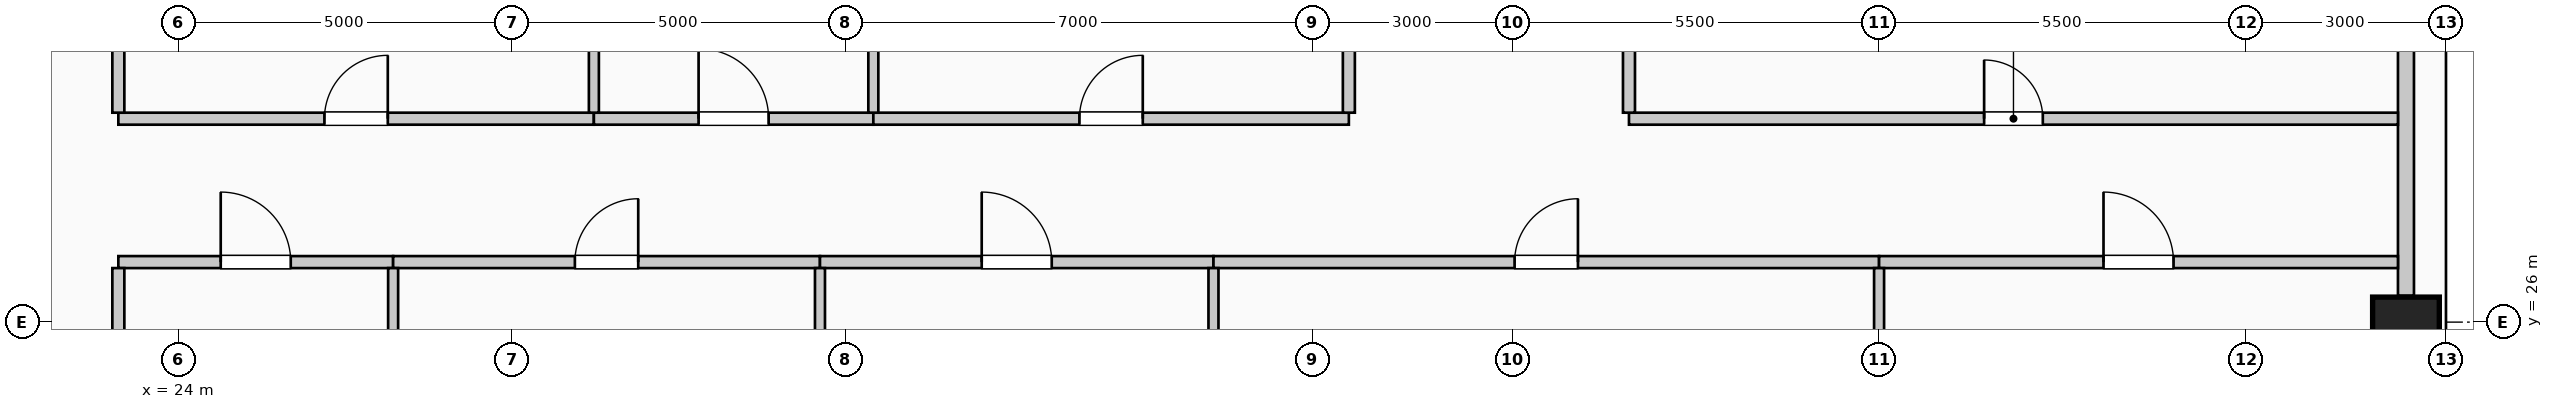
"""IFC4 building model, lengths in metres.
Left out: names, types, materials, properties, quantities, classifications, styles, units other than length and angle.
Written with IfcOpenShell. Run it as: python <this file> out.ifc"""

import sys

from ifc_helpers import new_model, si_unit, direction, frame, frame_2d, origin, origin_2d, place, context, subcontext, project, spatial, rectangle, extrude, element, fill, save


model = new_model("IFC4")
c1 = context("Model", 3, precision=1e-05, world=origin(), true_north=direction((0.0, 1.0)))
c2 = subcontext(c1, "Body", "Model", "MODEL_VIEW")
j1 = project(units=[si_unit("LENGTHUNIT", "METRE"), si_unit("PLANEANGLEUNIT", "RADIAN")], contexts=[c1])
p1 = place(None, origin())
s1 = spatial("IfcSite", under=j1, at=p1, CompositionType="ELEMENT")
p2 = place(p1, origin())
s2 = spatial("IfcBuilding", under=s1, at=p2, CompositionType="ELEMENT")
p3 = place(p2, frame((0.0, 0.0, 260.6)))
s3 = spatial("IfcBuildingStorey", under=s2, at=p3, CompositionType="ELEMENT", Elevation=260.6)
p4 = place(p3, frame((57.4, 26.0, 0.0), z_axis=(0.0, 0.0, 1.0), x_axis=(0.0, 1.0, 0.0)))
e1 = element("IfcColumn", 1, at=p4, inside=s3, PredefinedType="COLUMN", context=c2, shape_type="SweptSolid", body=[
    extrude(rectangle(XDim=0.75, YDim=1.0, at=origin_2d()), origin(), (0.0, 0.0, 1.0), 4.0),
])
p5 = place(p3, frame((57.4, 33.605, 0.0), z_axis=(0.0, 0.0, 1.0), x_axis=(0.0, -1.0, 0.0)))
e2 = element("IfcWall", 2, at=p5, inside=s3, PredefinedType="SOLIDWALL", context=c2, shape_type="SweptSolid", body=[
    extrude(rectangle(XDim=7.21, YDim=0.24, at=frame_2d((3.605, 0.0))), origin(), (0.0, 0.0, 1.0), 3.0),
])
p6 = place(p3, frame((23.1, 26.9, 0.0), z_axis=(0.0, 0.0, 1.0), x_axis=(1.0, 0.0, 0.0)))
e3 = element("IfcWall", 3, at=p6, inside=s3, PredefinedType="PARTITIONING", context=c2, shape_type="SweptSolid", body=[
    extrude(rectangle(XDim=4.12, YDim=0.18, at=frame_2d((2.06, 0.0))), origin(), (0.0, 0.0, 1.0), 3.75),
])
p7 = place(p6, frame((1.535, 0.0, 0.0)))
e4 = element("IfcOpeningElement", 4, at=p7, cuts=e3, PredefinedType="OPENING", context=c2, shape_type="SweptSolid", body=[
    extrude(rectangle(XDim=1.05, YDim=2.15, at=frame_2d((0.525, 1.075))), frame((0.0, 0.1, 0.0), z_axis=(0.0, -1.0, 0.0), x_axis=(1.0, 0.0, 0.0)), (0.0, 0.0, 1.0), 0.2),
])
p8 = place(p3, frame((27.22, 26.9, 0.0), z_axis=(0.0, 0.0, 1.0), x_axis=(1.0, 0.0, 0.0)))
e5 = element("IfcWall", 5, at=p8, inside=s3, PredefinedType="PARTITIONING", context=c2, shape_type="SweptSolid", body=[
    extrude(rectangle(XDim=6.4, YDim=0.18, at=frame_2d((3.2, 0.0))), origin(), (0.0, 0.0, 1.0), 3.75),
])
p9 = place(p8, frame((2.725, 0.0, 0.0)))
e6 = element("IfcOpeningElement", 6, at=p9, cuts=e5, PredefinedType="OPENING", context=c2, shape_type="SweptSolid", body=[
    extrude(rectangle(XDim=0.95, YDim=2.15, at=frame_2d((0.475, 1.075))), frame((0.0, 0.1, 0.0), z_axis=(0.0, -1.0, 0.0), x_axis=(1.0, 0.0, 0.0)), (0.0, 0.0, 1.0), 0.2),
])
p10 = place(p3, frame((33.62, 26.9, 0.0), z_axis=(0.0, 0.0, 1.0), x_axis=(1.0, 0.0, 0.0)))
e7 = element("IfcWall", 7, at=p10, inside=s3, PredefinedType="PARTITIONING", context=c2, shape_type="SweptSolid", body=[
    extrude(rectangle(XDim=5.9, YDim=0.18, at=frame_2d((2.95, 0.0))), origin(), (0.0, 0.0, 1.0), 3.75),
])
p11 = place(p10, frame((2.425, 0.0, 0.0)))
e8 = element("IfcOpeningElement", 8, at=p11, cuts=e7, PredefinedType="OPENING", context=c2, shape_type="SweptSolid", body=[
    extrude(rectangle(XDim=1.05, YDim=2.15, at=frame_2d((0.525, 1.075))), frame((0.0, 0.1, 0.0), z_axis=(0.0, -1.0, 0.0), x_axis=(1.0, 0.0, 0.0)), (0.0, 0.0, 1.0), 0.2),
])
p12 = place(p3, frame((39.52, 26.9, 0.0), z_axis=(0.0, 0.0, 1.0), x_axis=(1.0, 0.0, 0.0)))
e9 = element("IfcWall", 9, at=p12, inside=s3, PredefinedType="PARTITIONING", context=c2, shape_type="SweptSolid", body=[
    extrude(rectangle(XDim=9.98, YDim=0.18, at=frame_2d((4.99, 0.0))), origin(), (0.0, 0.0, 1.0), 3.75),
])
p13 = place(p12, frame((4.515, 0.0, 0.0)))
e10 = element("IfcOpeningElement", 10, at=p13, cuts=e9, PredefinedType="OPENING", context=c2, shape_type="SweptSolid", body=[
    extrude(rectangle(XDim=0.95, YDim=2.15, at=frame_2d((0.475, 1.075))), frame((0.0, 0.1, 0.0), z_axis=(0.0, -1.0, 0.0), x_axis=(1.0, 0.0, 0.0)), (0.0, 0.0, 1.0), 0.2),
])
p14 = place(p3, frame((49.5, 26.9, 0.0), z_axis=(0.0, 0.0, 1.0), x_axis=(1.0, 0.0, 0.0)))
e11 = element("IfcWall", 11, at=p14, inside=s3, PredefinedType="PARTITIONING", context=c2, shape_type="SweptSolid", body=[
    extrude(rectangle(XDim=7.78, YDim=0.18, at=frame_2d((3.89, 0.0))), origin(), (0.0, 0.0, 1.0), 3.75),
])
p15 = place(p14, frame((3.365, 0.0, 0.0)))
e12 = element("IfcOpeningElement", 12, at=p15, cuts=e11, PredefinedType="OPENING", context=c2, shape_type="SweptSolid", body=[
    extrude(rectangle(XDim=1.05, YDim=2.15, at=frame_2d((0.525, 1.075))), frame((0.0, 0.1, 0.0), z_axis=(0.0, -1.0, 0.0), x_axis=(1.0, 0.0, 0.0)), (0.0, 0.0, 1.0), 0.2),
])
p16 = place(p3, frame((23.1, 29.05, 0.0), z_axis=(0.0, 0.0, 1.0), x_axis=(1.0, 0.0, 0.0)))
e13 = element("IfcWall", 13, at=p16, inside=s3, PredefinedType="PARTITIONING", context=c2, shape_type="SweptSolid", body=[
    extrude(rectangle(XDim=7.13, YDim=0.18, at=frame_2d((3.565, 0.0))), origin(), (0.0, 0.0, 1.0), 3.75),
])
p17 = place(p16, frame((3.09, 0.0, 0.0)))
e14 = element("IfcOpeningElement", 14, at=p17, cuts=e13, PredefinedType="OPENING", context=c2, shape_type="SweptSolid", body=[
    extrude(rectangle(XDim=0.95, YDim=2.15, at=frame_2d((0.475, 1.075))), frame((0.0, 0.1, 0.0), z_axis=(0.0, -1.0, 0.0), x_axis=(1.0, 0.0, 0.0)), (0.0, 0.0, 1.0), 0.2),
])
p18 = place(p3, frame((30.23, 29.05, 0.0), z_axis=(0.0, 0.0, 1.0), x_axis=(1.0, 0.0, 0.0)))
e15 = element("IfcWall", 15, at=p18, inside=s3, PredefinedType="PARTITIONING", context=c2, shape_type="SweptSolid", body=[
    extrude(rectangle(XDim=4.19, YDim=0.18, at=frame_2d((2.095, 0.0))), origin(), (0.0, 0.0, 1.0), 3.75),
])
p19 = place(p18, frame((1.57, 0.0, 0.0)))
e16 = element("IfcOpeningElement", 16, at=p19, cuts=e15, PredefinedType="OPENING", context=c2, shape_type="SweptSolid", body=[
    extrude(rectangle(XDim=1.05, YDim=2.15, at=frame_2d((0.525, 1.075))), frame((0.0, 0.1, 0.0), z_axis=(0.0, -1.0, 0.0), x_axis=(1.0, 0.0, 0.0)), (0.0, 0.0, 1.0), 0.2),
])
p20 = place(p3, frame((34.42, 29.05, 0.0), z_axis=(0.0, 0.0, 1.0), x_axis=(1.0, 0.0, 0.0)))
e17 = element("IfcWall", 17, at=p20, inside=s3, PredefinedType="PARTITIONING", context=c2, shape_type="SweptSolid", body=[
    extrude(rectangle(XDim=7.13, YDim=0.18, at=frame_2d((3.565, 0.0))), origin(), (0.0, 0.0, 1.0), 3.75),
])
p21 = place(p20, frame((3.09, 0.0, 0.0)))
e18 = element("IfcOpeningElement", 18, at=p21, cuts=e17, PredefinedType="OPENING", context=c2, shape_type="SweptSolid", body=[
    extrude(rectangle(XDim=0.95, YDim=2.15, at=frame_2d((0.475, 1.075))), frame((0.0, 0.1, 0.0), z_axis=(0.0, -1.0, 0.0), x_axis=(1.0, 0.0, 0.0)), (0.0, 0.0, 1.0), 0.2),
])
p22 = place(p3, frame((45.75, 29.05, 0.0), z_axis=(0.0, 0.0, 1.0), x_axis=(1.0, 0.0, 0.0)))
e19 = element("IfcWall", 19, at=p22, inside=s3, PredefinedType="PARTITIONING", context=c2, shape_type="SweptSolid", body=[
    extrude(rectangle(XDim=11.53, YDim=0.18, at=frame_2d((5.765, 0.0))), origin(), (0.0, 0.0, 1.0), 3.75),
])
p23 = place(p22, frame((5.325, 0.0, 0.0)))
e20 = element("IfcOpeningElement", 20, at=p23, cuts=e19, PredefinedType="OPENING", context=c2, shape_type="SweptSolid", body=[
    extrude(rectangle(XDim=0.88, YDim=2.1, at=frame_2d((0.44, 1.05))), frame((0.0, 0.1, 0.0), z_axis=(0.0, -1.0, 0.0), x_axis=(1.0, 0.0, 0.0)), (0.0, 0.0, 1.0), 0.2),
])
p24 = place(p3, frame((23.1, 17.3, 0.0), z_axis=(0.0, 0.0, 1.0), x_axis=(0.0, 1.0, 0.0)))
e21 = element("IfcWall", 21, at=p24, inside=s3, PredefinedType="PARTITIONING", context=c2, shape_type="SweptSolid", body=[
    extrude(rectangle(XDim=9.51, YDim=0.18, at=frame_2d((4.755, 0.0))), origin(), (0.0, 0.0, 1.0), 3.75),
])
p25 = place(p3, frame((23.1, 29.14, 0.0), z_axis=(0.0, 0.0, 1.0), x_axis=(0.0, 1.0, 0.0)))
e22 = element("IfcWall", 22, at=p25, inside=s3, PredefinedType="PARTITIONING", context=c2, shape_type="SweptSolid", body=[
    extrude(rectangle(XDim=3.12, YDim=0.18, at=frame_2d((1.56, 0.0))), origin(), (0.0, 0.0, 1.0), 3.75),
])
p26 = place(p3, frame((27.22, 0.72, 0.0), z_axis=(0.0, 0.0, 1.0), x_axis=(0.0, 1.0, 0.0)))
e23 = element("IfcWall", 23, at=p26, inside=s3, PredefinedType="PARTITIONING", context=c2, shape_type="SweptSolid", body=[
    extrude(rectangle(XDim=26.09, YDim=0.15, at=frame_2d((13.045, 0.0))), origin(), (0.0, 0.0, 1.0), 3.75),
])
p27 = place(p3, frame((30.23, 29.14, 0.0), z_axis=(0.0, 0.0, 1.0), x_axis=(0.0, 1.0, 0.0)))
e24 = element("IfcWall", 24, at=p27, inside=s3, PredefinedType="PARTITIONING", context=c2, shape_type="SweptSolid", body=[
    extrude(rectangle(XDim=16.14, YDim=0.15, at=frame_2d((8.07, 0.0))), origin(), (0.0, 0.0, 1.0), 3.75),
])
p28 = place(p3, frame((33.62, 18.425, 0.0), z_axis=(0.0, 0.0, 1.0), x_axis=(0.0, 1.0, 0.0)))
e25 = element("IfcWall", 25, at=p28, inside=s3, PredefinedType="PARTITIONING", context=c2, shape_type="SweptSolid", body=[
    extrude(rectangle(XDim=8.385, YDim=0.15, at=frame_2d((4.192, 0.0))), origin(), (0.0, 0.0, 1.0), 3.75),
])
p29 = place(p3, frame((34.42, 29.14, 0.0), z_axis=(0.0, 0.0, 1.0), x_axis=(0.0, 1.0, 0.0)))
e26 = element("IfcWall", 26, at=p29, inside=s3, PredefinedType="PARTITIONING", context=c2, shape_type="SweptSolid", body=[
    extrude(rectangle(XDim=4.435, YDim=0.15, at=frame_2d((2.218, 0.0))), origin(), (0.0, 0.0, 1.0), 3.75),
])
p30 = place(p3, frame((39.52, 0.72, 0.0), z_axis=(0.0, 0.0, 1.0), x_axis=(0.0, 1.0, 0.0)))
e27 = element("IfcWall", 27, at=p30, inside=s3, PredefinedType="PARTITIONING", context=c2, shape_type="SweptSolid", body=[
    extrude(rectangle(XDim=26.09, YDim=0.15, at=frame_2d((13.045, 0.0))), origin(), (0.0, 0.0, 1.0), 3.75),
])
p31 = place(p3, frame((41.55, 29.14, 0.0), z_axis=(0.0, 0.0, 1.0), x_axis=(0.0, 1.0, 0.0)))
e28 = element("IfcWall", 28, at=p31, inside=s3, PredefinedType="PARTITIONING", context=c2, shape_type="SweptSolid", body=[
    extrude(rectangle(XDim=3.21, YDim=0.18, at=frame_2d((1.605, 0.0))), origin(), (0.0, 0.0, 1.0), 3.195),
])
p32 = place(p3, frame((45.75, 29.14, 0.0), z_axis=(0.0, 0.0, 1.0), x_axis=(0.0, 1.0, 0.0)))
e29 = element("IfcWall", 29, at=p32, inside=s3, PredefinedType="PARTITIONING", context=c2, shape_type="SweptSolid", body=[
    extrude(rectangle(XDim=3.135, YDim=0.18, at=frame_2d((1.567, 0.0))), origin(), (0.0, 0.0, 1.0), 3.75),
])
p33 = place(p3, frame((49.5, 1.1, 0.0), z_axis=(0.0, 0.0, 1.0), x_axis=(0.0, 1.0, 0.0)))
e30 = element("IfcWall", 30, at=p33, inside=s3, PredefinedType="PARTITIONING", context=c2, shape_type="SweptSolid", body=[
    extrude(rectangle(XDim=25.71, YDim=0.15, at=frame_2d((12.855, 0.0))), origin(), (0.0, 0.0, 1.0), 3.75),
])
p34 = place(p7, origin())
e31 = element("IfcDoor", 31, at=p34, inside=s3, OperationType="SINGLE_SWING_LEFT", PredefinedType="DOOR", context=c2, shape_type="SweptSolid", body=[
    extrude(rectangle(XDim=1.05, YDim=2.15, at=frame_2d((0.525, 1.075))), frame((0.0, 0.025, 0.0), z_axis=(0.0, -1.0, 0.0), x_axis=(1.0, 0.0, 0.0)), (0.0, 0.0, 1.0), 0.05),
])
fill(e4, e31)
p35 = place(p9, origin())
e32 = element("IfcDoor", 32, at=p35, inside=s3, OperationType="SINGLE_SWING_RIGHT", PredefinedType="DOOR", context=c2, shape_type="SweptSolid", body=[
    extrude(rectangle(XDim=0.95, YDim=2.15, at=frame_2d((0.475, 1.075))), frame((0.0, 0.025, 0.0), z_axis=(0.0, -1.0, 0.0), x_axis=(1.0, 0.0, 0.0)), (0.0, 0.0, 1.0), 0.05),
])
fill(e6, e32)
p36 = place(p11, origin())
e33 = element("IfcDoor", 33, at=p36, inside=s3, OperationType="SINGLE_SWING_LEFT", PredefinedType="DOOR", context=c2, shape_type="SweptSolid", body=[
    extrude(rectangle(XDim=1.05, YDim=2.15, at=frame_2d((0.525, 1.075))), frame((0.0, 0.025, 0.0), z_axis=(0.0, -1.0, 0.0), x_axis=(1.0, 0.0, 0.0)), (0.0, 0.0, 1.0), 0.05),
])
fill(e8, e33)
p37 = place(p13, origin())
e34 = element("IfcDoor", 34, at=p37, inside=s3, OperationType="SINGLE_SWING_RIGHT", PredefinedType="DOOR", context=c2, shape_type="SweptSolid", body=[
    extrude(rectangle(XDim=0.95, YDim=2.15, at=frame_2d((0.475, 1.075))), frame((0.0, 0.025, 0.0), z_axis=(0.0, -1.0, 0.0), x_axis=(1.0, 0.0, 0.0)), (0.0, 0.0, 1.0), 0.05),
])
fill(e10, e34)
p38 = place(p15, origin())
e35 = element("IfcDoor", 35, at=p38, inside=s3, OperationType="SINGLE_SWING_LEFT", PredefinedType="DOOR", context=c2, shape_type="SweptSolid", body=[
    extrude(rectangle(XDim=1.05, YDim=2.15, at=frame_2d((0.525, 1.075))), frame((0.0, 0.025, 0.0), z_axis=(0.0, -1.0, 0.0), x_axis=(1.0, 0.0, 0.0)), (0.0, 0.0, 1.0), 0.05),
])
fill(e12, e35)
p39 = place(p17, origin())
e36 = element("IfcDoor", 36, at=p39, inside=s3, OperationType="SINGLE_SWING_RIGHT", PredefinedType="DOOR", context=c2, shape_type="SweptSolid", body=[
    extrude(rectangle(XDim=0.95, YDim=2.15, at=frame_2d((0.475, 1.075))), frame((0.0, 0.025, 0.0), z_axis=(0.0, -1.0, 0.0), x_axis=(1.0, 0.0, 0.0)), (0.0, 0.0, 1.0), 0.05),
])
fill(e14, e36)
p40 = place(p19, origin())
e37 = element("IfcDoor", 37, at=p40, inside=s3, OperationType="SINGLE_SWING_LEFT", PredefinedType="DOOR", context=c2, shape_type="SweptSolid", body=[
    extrude(rectangle(XDim=1.05, YDim=2.15, at=frame_2d((0.525, 1.075))), frame((0.0, 0.025, 0.0), z_axis=(0.0, -1.0, 0.0), x_axis=(1.0, 0.0, 0.0)), (0.0, 0.0, 1.0), 0.05),
])
fill(e16, e37)
p41 = place(p21, origin())
e38 = element("IfcDoor", 38, at=p41, inside=s3, OperationType="SINGLE_SWING_RIGHT", PredefinedType="DOOR", context=c2, shape_type="SweptSolid", body=[
    extrude(rectangle(XDim=0.95, YDim=2.15, at=frame_2d((0.475, 1.075))), frame((0.0, 0.025, 0.0), z_axis=(0.0, -1.0, 0.0), x_axis=(1.0, 0.0, 0.0)), (0.0, 0.0, 1.0), 0.05),
])
fill(e18, e38)
p42 = place(p23, origin())
e39 = element("IfcDoor", 39, at=p42, inside=s3, OperationType="SINGLE_SWING_LEFT", PredefinedType="DOOR", context=c2, shape_type="SweptSolid", body=[
    extrude(rectangle(XDim=0.88, YDim=2.1, at=frame_2d((0.44, 1.05))), frame((0.0, 0.025, 0.0), z_axis=(0.0, -1.0, 0.0), x_axis=(1.0, 0.0, 0.0)), (0.0, 0.0, 1.0), 0.05),
])
fill(e20, e39)
save(model, sys.argv[1])
